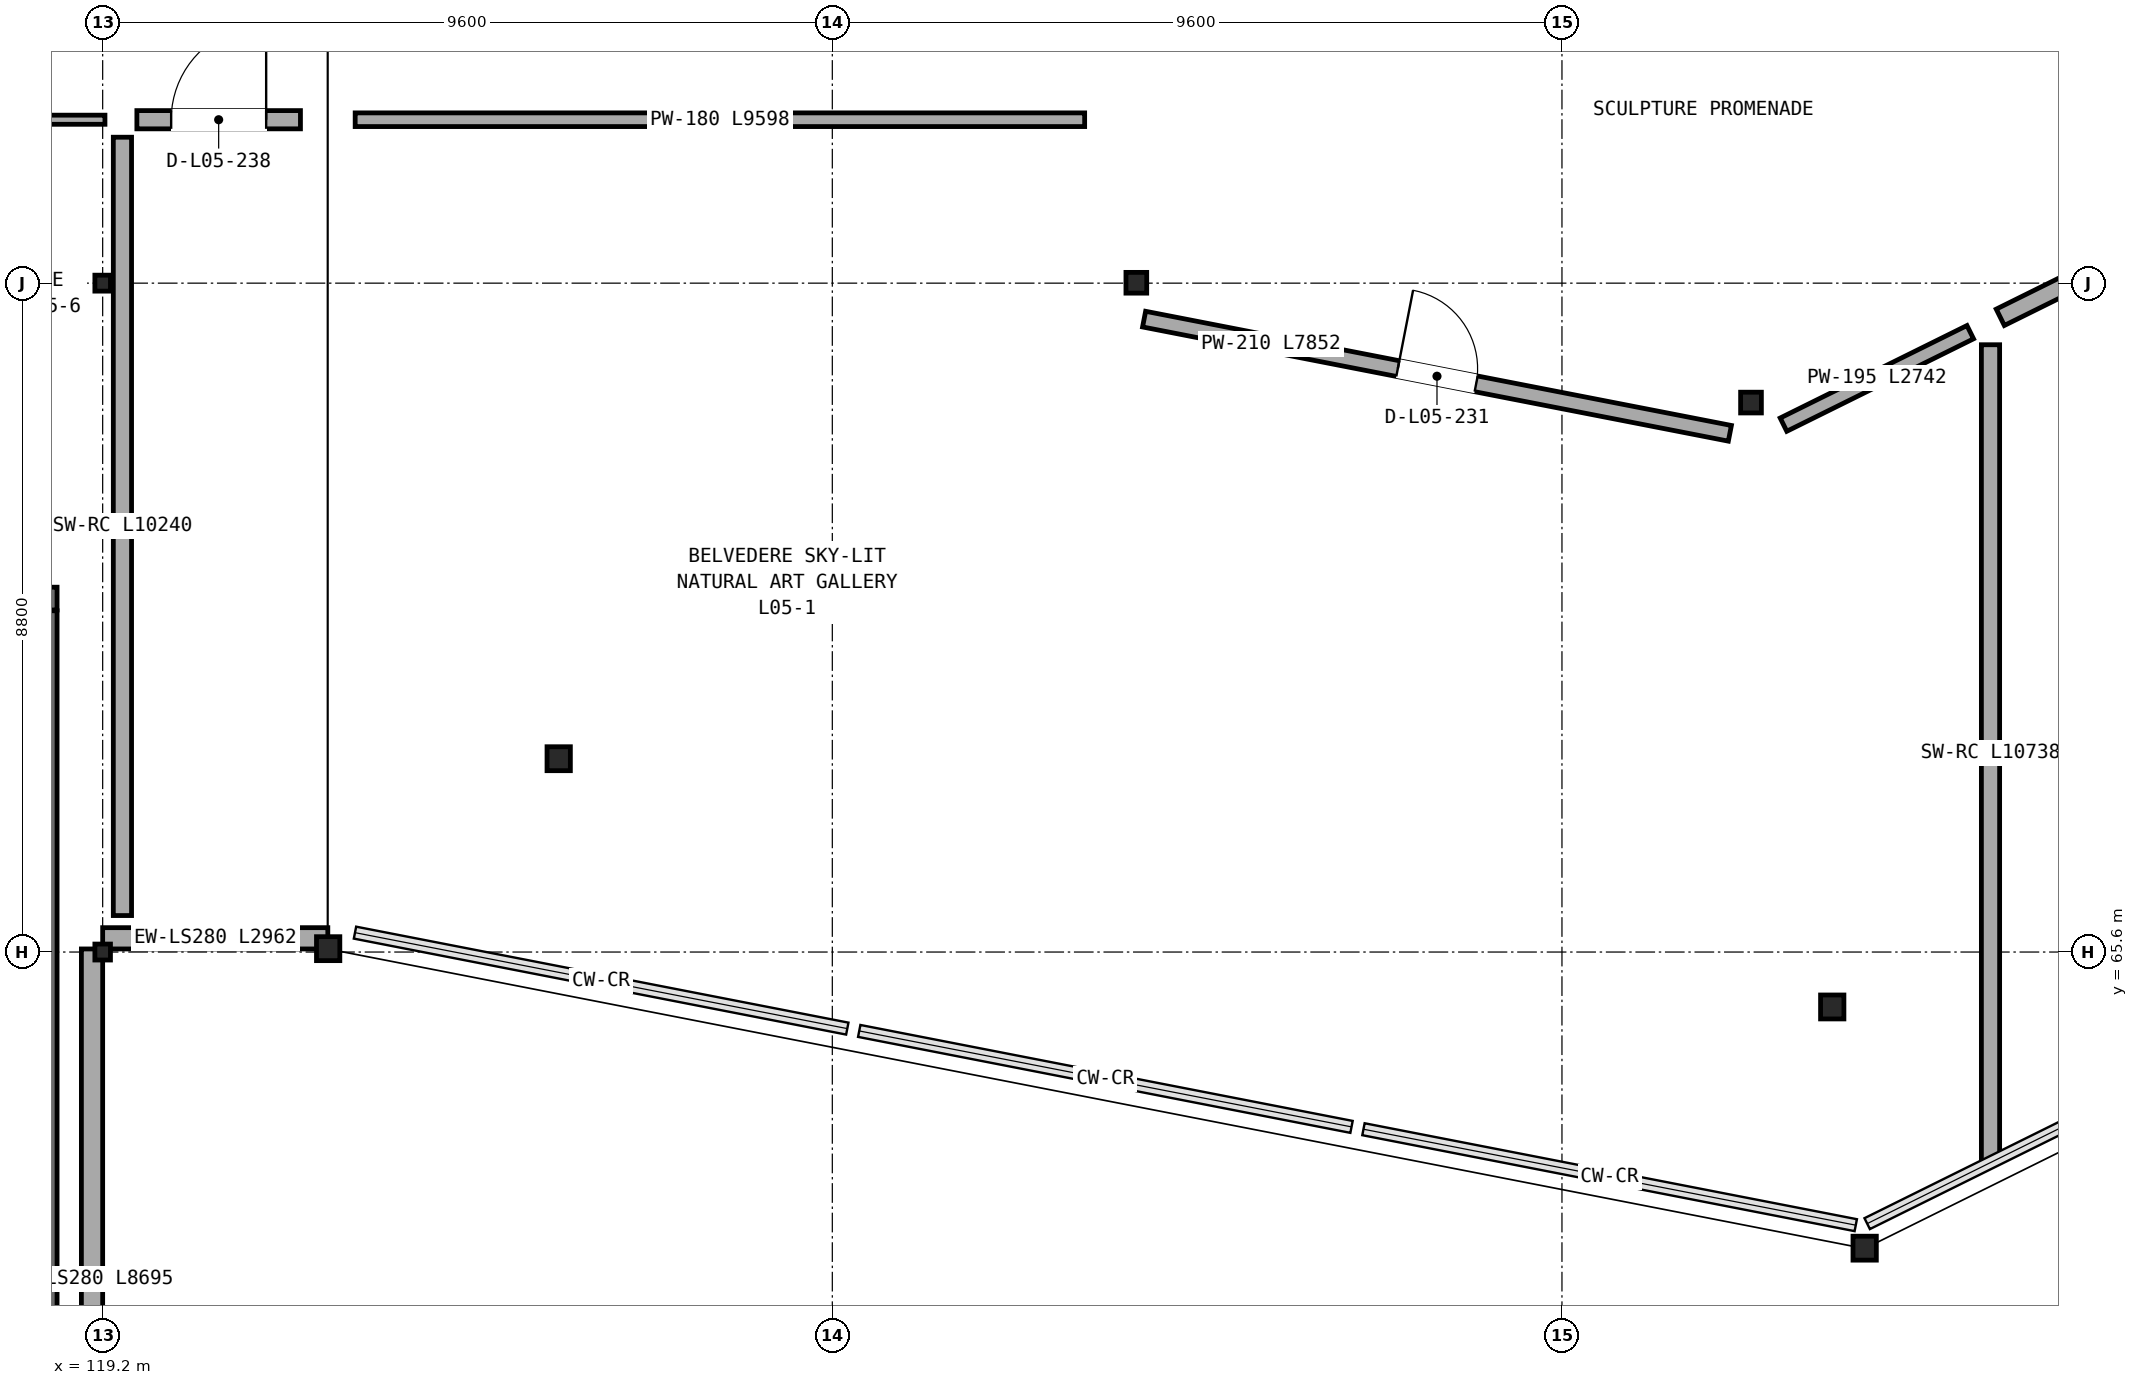
"""IFC4 building model, lengths in metres.
Left out: names, types, materials, properties, quantities, classifications, styles, units other than length and angle.
Written with IfcOpenShell. Run it as: python <this file> out.ifc"""

import sys

from ifc_helpers import new_model, si_unit, direction, frame, frame_2d, origin, origin_2d, place, context, subcontext, project, spatial, rectangle, hollow_circle, i_section, extrude, element, fill, save


model = new_model("IFC4")
c1 = context("Model", 3, precision=1e-05, world=origin(), true_north=direction((0.0, 1.0)))
c2 = subcontext(c1, "Body", "Model", "MODEL_VIEW")
j1 = project(units=[si_unit("LENGTHUNIT", "METRE"), si_unit("PLANEANGLEUNIT", "RADIAN")], contexts=[c1])
p1 = place(None, origin())
s1 = spatial("IfcSite", under=j1, at=p1, CompositionType="ELEMENT")
p2 = place(p1, origin())
s2 = spatial("IfcBuilding", under=s1, at=p2, CompositionType="ELEMENT")
p3 = place(p2, frame((0.0, 0.0, 28.1)))
s3 = spatial("IfcBuildingStorey", under=s2, at=p3, CompositionType="ELEMENT", Elevation=28.1)
for number, where, z_axis, x_axis in (
    (1, (119.2, 65.6, 0.0), (0.0, 0.0, 1.0), (1.0, 0.0, 0.0)),
    (2, (119.2, 74.4, 0.0), (0.0, 0.0, 1.0), (1.0, 0.0, 0.0)),
):
    element("IfcColumn", number, at=place(p3, frame(where, z_axis=z_axis, x_axis=x_axis)), inside=s3, PredefinedType="COLUMN", context=c2, shape_type="SweptSolid", body=[
        extrude(i_section(OverallWidth=0.205, OverallDepth=0.21, WebThickness=0.009, FlangeThickness=0.014, FilletRadius=0.01, at=origin_2d()), origin(), (0.0, 0.0, 1.0), 4.5),
    ])
p4 = place(p3, frame((122.167, 65.644, 0.035), z_axis=(0.062453755239, 0.051450286261, 0.996720821745), x_axis=(-0.635838190317, 0.771822386132, 0.0)))
e3 = element("IfcColumn", 3, at=p4, inside=s3, PredefinedType="COLUMN", context=c2, shape_type="SweptSolid", body=[
    extrude(i_section(OverallWidth=0.307, OverallDepth=0.315, WebThickness=0.012, FlangeThickness=0.019, FilletRadius=0.017, at=origin_2d()), origin(), (0.0, 0.0, 1.0), 4.038),
])
p5 = place(p3, frame((125.2, 68.143, 0.0), z_axis=(0.0, 0.0, 1.0), x_axis=(1.0, 0.0, 0.0)))
e4 = element("IfcColumn", 4, at=p5, inside=s3, PredefinedType="COLUMN", context=c2, shape_type="SweptSolid", body=[
    extrude(i_section(OverallWidth=0.307, OverallDepth=0.315, WebThickness=0.012, FlangeThickness=0.019, FilletRadius=0.017, at=origin_2d()), origin(), (0.0, 0.0, 1.0), 4.3),
])
p6 = place(p3, frame((132.8, 74.405, 0.0), z_axis=(0.0, 0.0, 1.0), x_axis=(1.0, 0.0, 0.0)))
e5 = element("IfcColumn", 5, at=p6, inside=s3, PredefinedType="COLUMN", context=c2, shape_type="SweptSolid", body=[
    extrude(hollow_circle(Radius=0.136, WallThickness=0.009, at=origin_2d()), origin(), (0.0, 0.0, 1.0), 4.3),
])
p7 = place(p3, frame((142.383, 61.704, 0.035), z_axis=(-0.007896587751, 0.058815963936, 0.998237610135), x_axis=(-0.991107268939, -0.133065327774, 0.0)))
e6 = element("IfcColumn", 6, at=p7, inside=s3, PredefinedType="COLUMN", context=c2, shape_type="SweptSolid", body=[
    extrude(i_section(OverallWidth=0.307, OverallDepth=0.315, WebThickness=0.012, FlangeThickness=0.019, FilletRadius=0.017, at=origin_2d()), origin(), (0.0, 0.0, 1.0), 4.483),
])
p8 = place(p3, frame((141.956, 64.877, 0.0), z_axis=(0.0, 0.0, 1.0), x_axis=(1.0, 0.0, 0.0)))
e7 = element("IfcColumn", 7, at=p8, inside=s3, PredefinedType="COLUMN", context=c2, shape_type="SweptSolid", body=[
    extrude(i_section(OverallWidth=0.307, OverallDepth=0.315, WebThickness=0.012, FlangeThickness=0.019, FilletRadius=0.017, at=origin_2d()), origin(), (0.0, 0.0, 1.0), 4.3),
])
p9 = place(p3, frame((140.887, 72.829, 0.0), z_axis=(0.0, 0.0, 1.0), x_axis=(1.0, 0.0, 0.0)))
e8 = element("IfcColumn", 8, at=p9, inside=s3, PredefinedType="COLUMN", context=c2, shape_type="SweptSolid", body=[
    extrude(hollow_circle(Radius=0.136, WallThickness=0.009, at=origin_2d()), origin(), (0.0, 0.0, 1.0), 4.3),
])
p10 = place(p3, frame((119.06, 56.946, 0.0), z_axis=(0.0, 0.0, 1.0), x_axis=(0.0, 1.0, 0.0)))
e9 = element("IfcWall", 9, at=p10, inside=s3, PredefinedType="STANDARD", context=c2, shape_type="SweptSolid", body=[
    extrude(rectangle(XDim=8.695, YDim=0.28, at=frame_2d((4.347, 0.0))), origin(), (0.0, 0.0, 1.0), 3.702),
])
p11 = place(p3, frame((119.2, 65.781, 0.0), z_axis=(0.0, 0.0, 1.0), x_axis=(1.0, 0.0, 0.0)))
e10 = element("IfcWall", 10, at=p11, inside=s3, PredefinedType="STANDARD", context=c2, shape_type="SweptSolid", body=[
    extrude(rectangle(XDim=2.962, YDim=0.28, at=frame_2d((1.481, 0.0))), origin(), (0.0, 0.0, 1.0), 3.255),
])
p12 = place(p3, frame((118.6, 70.25, 0.0), z_axis=(0.0, 0.0, 1.0), x_axis=(-1.0, 0.0, 0.0)))
e11 = element("IfcWall", 11, at=p12, inside=s3, PredefinedType="SHEAR", context=c2, shape_type="SweptSolid", body=[
    extrude(rectangle(XDim=8.4, YDim=0.3, at=frame_2d((4.2, 0.0))), origin(), (0.0, 0.0, 1.0), 4.245),
])
p13 = place(p12, frame((1.025, 0.0, 0.0)))
e12 = element("IfcOpeningElement", 12, at=p13, cuts=e11, PredefinedType="OPENING", context=c2, shape_type="SweptSolid", body=[
    extrude(rectangle(XDim=1.45, YDim=2.25, at=frame_2d((0.725, 1.125))), frame((0.0, 0.16, 0.0), z_axis=(0.0, -1.0, 0.0), x_axis=(1.0, 0.0, 0.0)), (0.0, 0.0, 1.0), 0.32),
])
p14 = place(p3, frame((118.45, 60.31, 0.0), z_axis=(0.0, 0.0, 1.0), x_axis=(0.0, 1.0, 0.0)))
e13 = element("IfcWall", 13, at=p14, inside=s3, PredefinedType="SHEAR", context=c2, shape_type="SweptSolid", body=[
    extrude(rectangle(XDim=9.78, YDim=0.3, at=frame_2d((4.89, 0.0))), origin(), (0.0, 0.0, 1.0), 4.245),
])
p15 = place(p3, frame((132.902, 73.927, 0.0), z_axis=(0.0, 0.0, 1.0), x_axis=(0.98152920164, -0.191312378918, 0.0)))
e14 = element("IfcWall", 14, at=p15, inside=s3, PredefinedType="PARTITIONING", context=c2, shape_type="SweptSolid", body=[
    extrude(rectangle(XDim=7.852, YDim=0.21, at=frame_2d((3.926, 0.0))), origin(), (0.0, 0.0, 1.0), 4.13),
])
p16 = place(p15, frame((3.401, 0.0, 0.0)))
e15 = element("IfcOpeningElement", 15, at=p16, cuts=e14, PredefinedType="OPENING", context=c2, shape_type="SweptSolid", body=[
    extrude(rectangle(XDim=1.05, YDim=2.15, at=frame_2d((0.525, 1.075))), frame((0.0, 0.115, 0.0), z_axis=(0.0, -1.0, 0.0), x_axis=(1.0, 0.0, 0.0)), (0.0, 0.0, 1.0), 0.23),
])
p17 = place(p3, frame((141.315, 72.538, 0.0), z_axis=(0.0, 0.0, 1.0), x_axis=(0.896183224419, 0.443684153729, 0.0)))
e16 = element("IfcWall", 16, at=p17, inside=s3, PredefinedType="PARTITIONING", context=c2, shape_type="SweptSolid", body=[
    extrude(rectangle(XDim=2.742, YDim=0.195, at=frame_2d((1.371, 0.0))), origin(), (0.0, 0.0, 1.0), 4.13),
])
p18 = place(p3, frame((122.522, 76.55, 0.0), z_axis=(0.0, 0.0, 1.0), x_axis=(1.0, 0.0, 0.0)))
e17 = element("IfcWall", 17, at=p18, inside=s3, PredefinedType="PARTITIONING", context=c2, shape_type="SweptSolid", body=[
    extrude(rectangle(XDim=9.598, YDim=0.18, at=frame_2d((4.799, 0.0))), origin(), (0.0, 0.0, 1.0), 2.45),
])
p19 = place(p3, frame((144.167, 73.951, 0.0), z_axis=(0.0, 0.0, 1.0), x_axis=(0.896176021212, 0.443698702956, 0.0)))
e18 = element("IfcWall", 18, at=p19, inside=s3, PredefinedType="SOLIDWALL", context=c2, shape_type="SweptSolid", body=[
    extrude(rectangle(XDim=8.705, YDim=0.24, at=frame_2d((4.353, 0.0))), origin(), (0.0, 0.0, 1.0), 2.45),
])
p20 = place(p3, frame((109.72, 76.55, 0.0), z_axis=(0.0, 0.0, 1.0), x_axis=(1.0, 0.0, 0.0)))
e19 = element("IfcWall", 19, at=p20, inside=s3, PredefinedType="PARTITIONING", context=c2, shape_type="SweptSolid", body=[
    extrude(rectangle(XDim=9.51, YDim=0.12, at=frame_2d((4.755, 0.0))), origin(), (0.0, 0.0, 1.0), 3.763),
])
p21 = place(p20, frame((4.27, 0.0, 0.0)))
e20 = element("IfcOpeningElement", 20, at=p21, cuts=e19, PredefinedType="OPENING", context=c2, shape_type="SweptSolid", body=[
    extrude(rectangle(XDim=0.97, YDim=2.16, at=frame_2d((0.485, 1.08))), frame((0.0, 0.07, 0.0), z_axis=(0.0, -1.0, 0.0), x_axis=(1.0, 0.0, 0.0)), (0.0, 0.0, 1.0), 0.14),
])
p22 = place(p3, frame((119.65, 76.55, 0.0), z_axis=(0.0, 0.0, 1.0), x_axis=(1.0, 0.0, 0.0)))
e21 = element("IfcWall", 21, at=p22, inside=s3, PredefinedType="SOLIDWALL", context=c2, shape_type="SweptSolid", body=[
    extrude(rectangle(XDim=2.152, YDim=0.24, at=frame_2d((1.076, 0.0))), origin(), (0.0, 0.0, 1.0), 4.13),
])
p23 = place(p22, frame((0.451, 0.0, 0.0)))
e22 = element("IfcOpeningElement", 22, at=p23, cuts=e21, PredefinedType="OPENING", context=c2, shape_type="SweptSolid", body=[
    extrude(rectangle(XDim=1.25, YDim=2.2, at=frame_2d((0.625, 1.1))), frame((0.0, 0.13, 0.0), z_axis=(0.0, -1.0, 0.0), x_axis=(1.0, 0.0, 0.0)), (0.0, 0.0, 1.0), 0.26),
])
p24 = place(p3, frame((144.038, 73.59, 0.0), z_axis=(0.0, 0.0, 1.0), x_axis=(0.0, -1.0, 0.0)))
e23 = element("IfcWall", 23, at=p24, inside=s3, PredefinedType="SOLIDWALL", context=c2, shape_type="SweptSolid", body=[
    extrude(rectangle(XDim=10.738, YDim=0.24, at=frame_2d((5.369, 0.0))), origin(), (0.0, 0.0, 1.0), 2.45),
])
p25 = place(p3, frame((119.46, 76.32, 0.0), z_axis=(0.0, 0.0, 1.0), x_axis=(0.0, -1.0, 0.0)))
e24 = element("IfcWall", 24, at=p25, inside=s3, PredefinedType="SOLIDWALL", context=c2, shape_type="SweptSolid", body=[
    extrude(rectangle(XDim=10.24, YDim=0.24, at=frame_2d((5.12, 0.0))), origin(), (0.0, 0.0, 1.0), 3.763),
])
p26 = place(p16, origin())
e25 = element("IfcDoor", 25, at=p26, inside=s3, OperationType="SINGLE_SWING_LEFT", PredefinedType="DOOR", context=c2, shape_type="SweptSolid", body=[
    extrude(rectangle(XDim=1.05, YDim=2.15, at=frame_2d((0.525, 1.075))), frame((0.0, 0.025, 0.0), z_axis=(0.0, -1.0, 0.0), x_axis=(1.0, 0.0, 0.0)), (0.0, 0.0, 1.0), 0.05),
])
fill(e15, e25)
p27 = place(p23, origin())
e26 = element("IfcDoor", 26, at=p27, inside=s3, OperationType="SINGLE_SWING_RIGHT", PredefinedType="DOOR", context=c2, shape_type="SweptSolid", body=[
    extrude(rectangle(XDim=1.25, YDim=2.2, at=frame_2d((0.625, 1.1))), frame((0.0, 0.025, 0.0), z_axis=(0.0, -1.0, 0.0), x_axis=(1.0, 0.0, 0.0)), (0.0, 0.0, 1.0), 0.05),
])
fill(e22, e26)
save(model, sys.argv[1])
